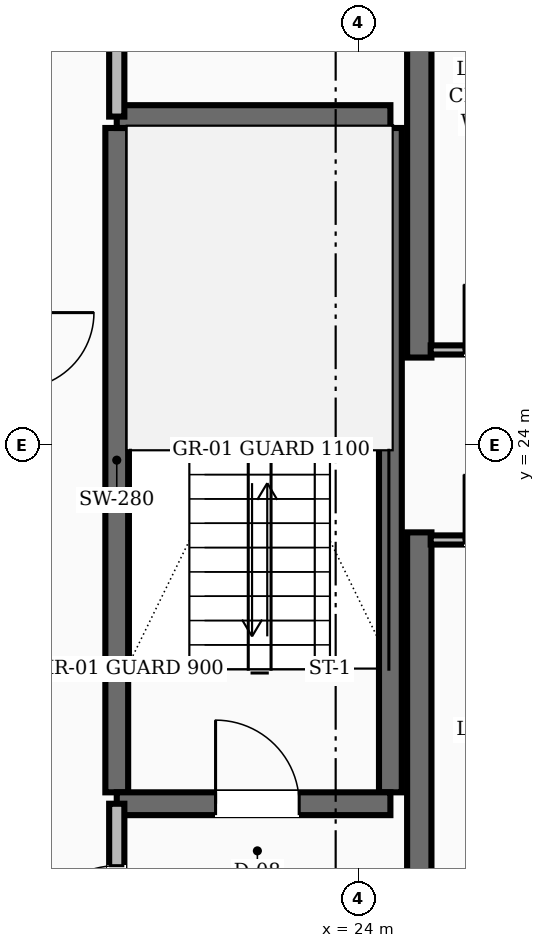
"""IFC4 building model, lengths in metres.
Left out: names, types, materials, properties, quantities, classifications, styles, units other than length and angle.
Written with IfcOpenShell. Run it as: python <this file> out.ifc"""

import sys

from ifc_helpers import new_model, si_unit, direction, frame, frame_2d, origin, place, context, subcontext, project, spatial, rectangle, extrude, element, fill, save


model = new_model("IFC4")
c1 = context("Model", 3, precision=1e-05, world=origin(), true_north=direction((0.0, 1.0)))
c2 = subcontext(c1, "Body", "Model", "MODEL_VIEW")
j1 = project(units=[si_unit("LENGTHUNIT", "METRE"), si_unit("PLANEANGLEUNIT", "RADIAN")], contexts=[c1])
p1 = place(None, origin())
s1 = spatial("IfcSite", under=j1, at=p1, CompositionType="ELEMENT")
p2 = place(p1, origin())
s2 = spatial("IfcBuilding", under=s1, at=p2, CompositionType="ELEMENT")
p3 = place(p2, frame((0.0, 0.0, 236.4)))
s3 = spatial("IfcBuildingStorey", under=s2, at=p3, CompositionType="ELEMENT", Elevation=236.4)
for number, where, z_axis, x_axis in (
    (1, (24.8, 16.55, 0.0), (0.0, 0.0, 1.0), (0.0, 1.0, 0.0)),
    (2, (24.8, 25.15, 0.0), (0.0, 0.0, 1.0), (0.0, 1.0, 0.0)),
):
    element("IfcWall", number, at=place(p3, frame(where, z_axis=z_axis, x_axis=x_axis)), inside=s3, PredefinedType="SHEAR", context=c2, shape_type="SweptSolid", body=[
        extrude(rectangle(XDim=6.3, YDim=0.32, at=frame_2d((3.15, 0.0))), origin(), (0.0, 0.0, 1.0), 3.6),
    ])
for number, where, z_axis, x_axis in (
    (3, (20.82, 19.43, 0.0), (0.0, 0.0, 1.0), (0.0, 1.0, 0.0)),
    (4, (24.42, 19.43, 0.0), (0.0, 0.0, 1.0), (0.0, 1.0, 0.0)),
):
    element("IfcWall", number, at=place(p3, frame(where, z_axis=z_axis, x_axis=x_axis)), inside=s3, PredefinedType="SHEAR", context=c2, shape_type="SweptSolid", body=[
        extrude(rectangle(XDim=8.74, YDim=0.3, at=frame_2d((4.37, 0.0))), origin(), (0.0, 0.0, 1.0), 3.6),
    ])
p4 = place(p3, frame((20.82, 19.28, 0.0), z_axis=(0.0, 0.0, 1.0), x_axis=(1.0, 0.0, 0.0)))
e5 = element("IfcWall", 5, at=p4, inside=s3, PredefinedType="SHEAR", context=c2, shape_type="SweptSolid", body=[
    extrude(rectangle(XDim=3.6, YDim=0.3, at=frame_2d((1.8, 0.0))), origin(), (0.0, 0.0, 1.0), 3.6),
])
p5 = place(p4, frame((1.3, 0.0, 0.0)))
e6 = element("IfcOpeningElement", 6, at=p5, cuts=e5, PredefinedType="OPENING", context=c2, shape_type="SweptSolid", body=[
    extrude(rectangle(XDim=1.1, YDim=2.1, at=frame_2d((0.55, 1.05))), frame((0.0, 0.16, 0.0), z_axis=(0.0, -1.0, 0.0), x_axis=(1.0, 0.0, 0.0)), (0.0, 0.0, 1.0), 0.32),
])
p6 = place(p3, frame((20.82, 28.32, 0.0), z_axis=(0.0, 0.0, 1.0), x_axis=(1.0, 0.0, 0.0)))
e7 = element("IfcWall", 7, at=p6, inside=s3, PredefinedType="SHEAR", context=c2, shape_type="SweptSolid", body=[
    extrude(rectangle(XDim=3.6, YDim=0.3, at=frame_2d((1.8, 0.0))), origin(), (0.0, 0.0, 1.0), 3.6),
])
p7 = place(p3, frame((20.82, 16.55, 0.0), z_axis=(0.0, 0.0, 1.0), x_axis=(0.0, 1.0, 0.0)))
e8 = element("IfcWall", 8, at=p7, inside=s3, PredefinedType="SOLIDWALL", context=c2, shape_type="SweptSolid", body=[
    extrude(rectangle(XDim=2.73, YDim=0.2, at=frame_2d((1.365, 0.0))), origin(), (0.0, 0.0, 1.0), 2.87),
])
p8 = place(p7, frame((0.815, 0.0, 0.0)))
e9 = element("IfcOpeningElement", 9, at=p8, cuts=e8, PredefinedType="OPENING", context=c2, shape_type="SweptSolid", body=[
    extrude(rectangle(XDim=1.1, YDim=2.1, at=frame_2d((0.55, 1.05))), frame((0.0, 0.11, 0.0), z_axis=(0.0, -1.0, 0.0), x_axis=(1.0, 0.0, 0.0)), (0.0, 0.0, 1.0), 0.22),
])
p9 = place(p3, frame((20.82, 28.32, 0.0), z_axis=(0.0, 0.0, 1.0), x_axis=(0.0, 1.0, 0.0)))
e10 = element("IfcWall", 10, at=p9, inside=s3, PredefinedType="SOLIDWALL", context=c2, shape_type="SweptSolid", body=[
    extrude(rectangle(XDim=3.13, YDim=0.2, at=frame_2d((1.565, 0.0))), origin(), (0.0, 0.0, 1.0), 2.87),
])
p10 = place(p9, frame((1.09, 0.0, 0.0)))
e11 = element("IfcOpeningElement", 11, at=p10, cuts=e10, PredefinedType="OPENING", context=c2, shape_type="SweptSolid", body=[
    extrude(rectangle(XDim=0.95, YDim=2.1, at=frame_2d((0.475, 1.05))), frame((0.0, 0.11, 0.0), z_axis=(0.0, -1.0, 0.0), x_axis=(1.0, 0.0, 0.0)), (0.0, 0.0, 1.0), 0.22),
])
p11 = place(p3, frame((24.95, 25.25, 0.0), z_axis=(0.0, 0.0, 1.0), x_axis=(1.0, 0.0, 0.0)))
e12 = element("IfcWall", 12, at=p11, inside=s3, PredefinedType="PARTITIONING", context=c2, shape_type="SweptSolid", body=[
    extrude(rectangle(XDim=3.2, YDim=0.12, at=frame_2d((1.6, 0.0))), origin(), (0.0, 0.0, 1.0), 2.87),
])
p12 = place(p11, frame((0.44, 0.0, 0.0)))
e13 = element("IfcOpeningElement", 13, at=p12, cuts=e12, PredefinedType="OPENING", context=c2, shape_type="SweptSolid", body=[
    extrude(rectangle(XDim=0.86, YDim=2.1, at=frame_2d((0.43, 1.05))), frame((0.0, 0.07, 0.0), z_axis=(0.0, -1.0, 0.0), x_axis=(1.0, 0.0, 0.0)), (0.0, 0.0, 1.0), 0.14),
])
p13 = place(p11, frame((1.9, 0.0, 0.0)))
e14 = element("IfcOpeningElement", 14, at=p13, cuts=e12, PredefinedType="OPENING", context=c2, shape_type="SweptSolid", body=[
    extrude(rectangle(XDim=0.86, YDim=2.1, at=frame_2d((0.43, 1.05))), frame((0.0, 0.07, 0.0), z_axis=(0.0, -1.0, 0.0), x_axis=(1.0, 0.0, 0.0)), (0.0, 0.0, 1.0), 0.14),
])
p14 = place(p3, frame((24.95, 22.75, 0.0), z_axis=(0.0, 0.0, 1.0), x_axis=(1.0, 0.0, 0.0)))
e15 = element("IfcWall", 15, at=p14, inside=s3, PredefinedType="PARTITIONING", context=c2, shape_type="SweptSolid", body=[
    extrude(rectangle(XDim=3.2, YDim=0.12, at=frame_2d((1.6, 0.0))), origin(), (0.0, 0.0, 1.0), 2.87),
])
p15 = place(p14, frame((0.44, 0.0, 0.0)))
e16 = element("IfcOpeningElement", 16, at=p15, cuts=e15, PredefinedType="OPENING", context=c2, shape_type="SweptSolid", body=[
    extrude(rectangle(XDim=0.86, YDim=2.1, at=frame_2d((0.43, 1.05))), frame((0.0, 0.07, 0.0), z_axis=(0.0, -1.0, 0.0), x_axis=(1.0, 0.0, 0.0)), (0.0, 0.0, 1.0), 0.14),
])
p16 = place(p14, frame((1.9, 0.0, 0.0)))
e17 = element("IfcOpeningElement", 17, at=p16, cuts=e15, PredefinedType="OPENING", context=c2, shape_type="SweptSolid", body=[
    extrude(rectangle(XDim=0.86, YDim=2.1, at=frame_2d((0.43, 1.05))), frame((0.0, 0.07, 0.0), z_axis=(0.0, -1.0, 0.0), x_axis=(1.0, 0.0, 0.0)), (0.0, 0.0, 1.0), 0.14),
])
p17 = place(p5, origin())
e18 = element("IfcDoor", 18, at=p17, inside=s3, OperationType="SINGLE_SWING_LEFT", PredefinedType="DOOR", context=c2, shape_type="SweptSolid", body=[
    extrude(rectangle(XDim=1.1, YDim=2.1, at=frame_2d((0.55, 1.05))), frame((0.0, 0.025, 0.0), z_axis=(0.0, -1.0, 0.0), x_axis=(1.0, 0.0, 0.0)), (0.0, 0.0, 1.0), 0.05),
])
fill(e6, e18)
p18 = place(p8, origin())
e19 = element("IfcDoor", 19, at=p18, inside=s3, OperationType="SINGLE_SWING_LEFT", PredefinedType="DOOR", context=c2, shape_type="SweptSolid", body=[
    extrude(rectangle(XDim=1.1, YDim=2.1, at=frame_2d((0.55, 1.05))), frame((0.0, 0.025, 0.0), z_axis=(0.0, -1.0, 0.0), x_axis=(1.0, 0.0, 0.0)), (0.0, 0.0, 1.0), 0.05),
])
fill(e9, e19)
p19 = place(p12, origin())
e20 = element("IfcDoor", 20, at=p19, inside=s3, OperationType="SINGLE_SWING_LEFT", PredefinedType="DOOR", context=c2, shape_type="SweptSolid", body=[
    extrude(rectangle(XDim=0.86, YDim=2.1, at=frame_2d((0.43, 1.05))), frame((0.0, 0.025, 0.0), z_axis=(0.0, -1.0, 0.0), x_axis=(1.0, 0.0, 0.0)), (0.0, 0.0, 1.0), 0.05),
])
fill(e13, e20)
p20 = place(p15, origin())
e21 = element("IfcDoor", 21, at=p20, inside=s3, OperationType="SINGLE_SWING_LEFT", PredefinedType="DOOR", context=c2, shape_type="SweptSolid", body=[
    extrude(rectangle(XDim=0.86, YDim=2.1, at=frame_2d((0.43, 1.05))), frame((0.0, 0.025, 0.0), z_axis=(0.0, -1.0, 0.0), x_axis=(1.0, 0.0, 0.0)), (0.0, 0.0, 1.0), 0.05),
])
fill(e16, e21)
save(model, sys.argv[1])
